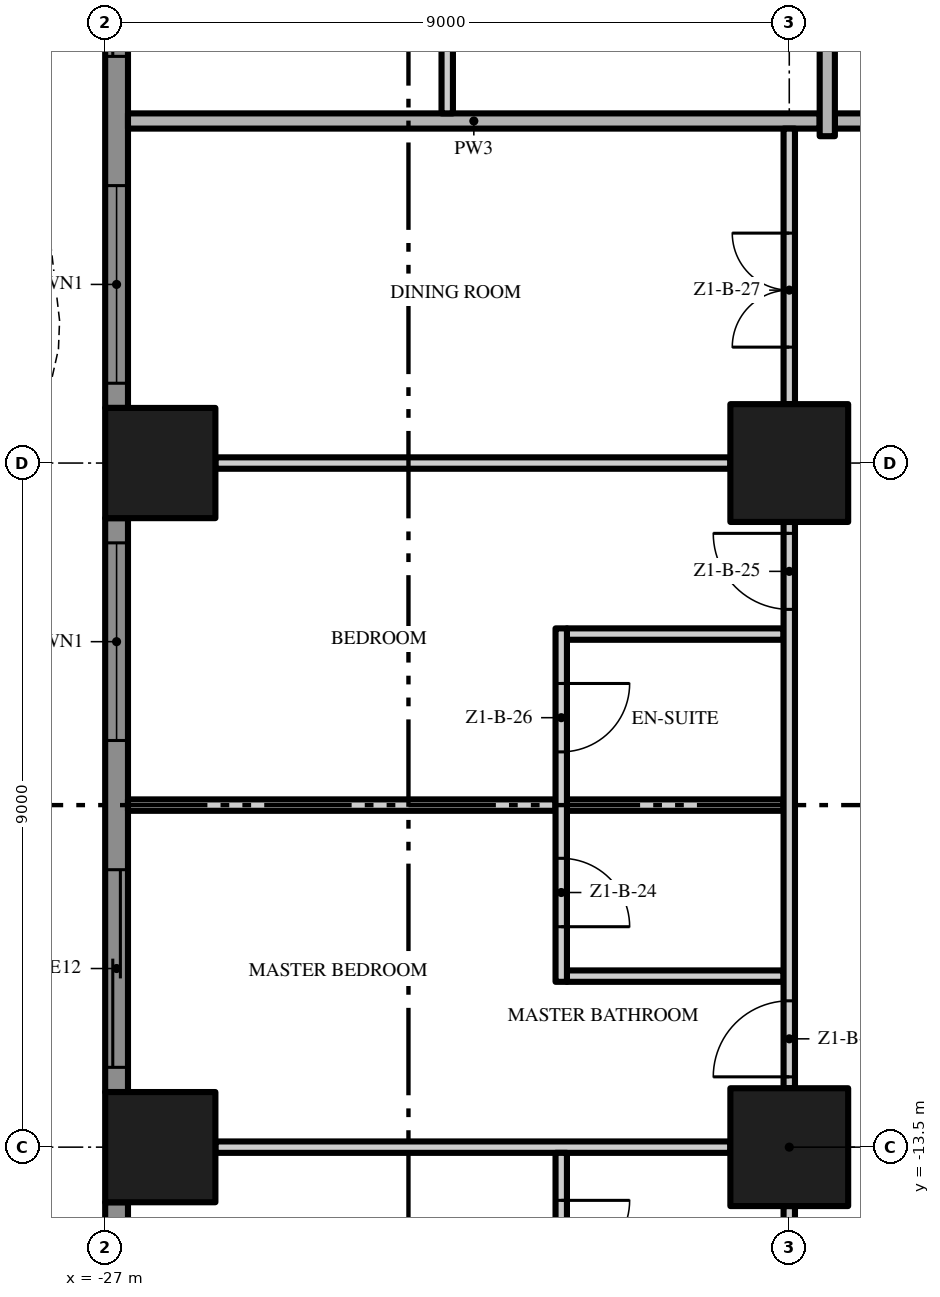
"""IFC4 building model, lengths in metres.
Left out: names, types, materials, properties, quantities, classifications, styles, units other than length and angle.
Written with IfcOpenShell. Run it as: python <this file> out.ifc"""

import sys

from ifc_helpers import new_model, si_unit, direction, frame, frame_2d, origin, origin_2d, place, context, subcontext, project, spatial, polyline, rectangle, outline, extrude, element, fill, save


model = new_model("IFC4")
c1 = context("Model", 3, precision=1e-05, world=origin(), true_north=direction((0.0, 1.0)))
c2 = subcontext(c1, "Body", "Model", "MODEL_VIEW")
j1 = project(units=[si_unit("LENGTHUNIT", "METRE"), si_unit("PLANEANGLEUNIT", "RADIAN")], contexts=[c1])
p1 = place(None, origin())
s1 = spatial("IfcSite", under=j1, at=p1, CompositionType="ELEMENT")
p2 = place(p1, origin())
s2 = spatial("IfcBuilding", under=s1, at=p2, CompositionType="ELEMENT")
p3 = place(p2, frame((0.0, 0.0, 26.4)))
s3 = spatial("IfcBuildingStorey", under=s2, at=p3, CompositionType="ELEMENT", Elevation=26.4)
for number, where, z_axis, x_axis in (
    (1, (-18.0, -13.5, 0.0), (0.0, 0.0, 1.0), (1.0, 0.0, 0.0)),
    (2, (-18.0, -4.5, 0.0), (0.0, 0.0, 1.0), (1.0, 0.0, 0.0)),
):
    element("IfcColumn", number, at=place(p3, frame(where, z_axis=z_axis, x_axis=x_axis)), inside=s3, PredefinedType="COLUMN", context=c2, shape_type="SweptSolid", body=[
        extrude(rectangle(XDim=1.55, YDim=1.55, at=origin_2d()), origin(), (0.0, 0.0, 1.0), 3.5),
    ])
for number, where, z_axis, x_axis in (
    (3, (-26.275, -13.5, 0.0), (0.0, 0.0, 1.0), (1.0, 0.0, 0.0)),
    (4, (-26.275, -4.5, 0.0), (0.0, 0.0, 1.0), (1.0, 0.0, 0.0)),
):
    element("IfcColumn", number, at=place(p3, frame(where, z_axis=z_axis, x_axis=x_axis)), inside=s3, PredefinedType="COLUMN", context=c2, shape_type="SweptSolid", body=[
        extrude(rectangle(XDim=1.45, YDim=1.45, at=origin_2d()), origin(), (0.0, 0.0, 1.0), 3.5),
    ])
p4 = place(p3, frame((-26.85, -3.775, 0.0), z_axis=(0.0, 0.0, 1.0), x_axis=(0.0, 1.0, 0.0)))
e5 = element("IfcWall", 5, at=p4, inside=s3, PredefinedType="SOLIDWALL", context=c2, shape_type="SweptSolid", body=[
    extrude(rectangle(XDim=7.55, YDim=0.3, at=frame_2d((3.775, 0.0))), origin(), (0.0, 0.0, 1.0), 3.5),
])
p5 = place(p4, frame((4.625, 0.0, 0.0)))
e6 = element("IfcOpeningElement", 6, at=p5, cuts=e5, PredefinedType="OPENING", context=c2, shape_type="SweptSolid", body=[
    extrude(rectangle(XDim=2.6, YDim=2.4, at=frame_2d((1.3, 1.2))), frame((0.0, 0.16, 0.0), z_axis=(0.0, -1.0, 0.0), x_axis=(1.0, 0.0, 0.0)), (0.0, 0.0, 1.0), 0.32),
])
p6 = place(p4, frame((0.325, 0.0, 0.45)))
e7 = element("IfcOpeningElement", 7, at=p6, cuts=e5, PredefinedType="OPENING", context=c2, shape_type="SweptSolid", body=[
    extrude(rectangle(XDim=2.6, YDim=2.65, at=frame_2d((1.3, 1.325))), frame((0.0, 0.16, 0.0), z_axis=(0.0, -1.0, 0.0), x_axis=(1.0, 0.0, 0.0)), (0.0, 0.0, 1.0), 0.32),
])
p7 = place(p3, frame((-26.85, -12.775, 0.0), z_axis=(0.0, 0.0, 1.0), x_axis=(0.0, 1.0, 0.0)))
e8 = element("IfcWall", 8, at=p7, inside=s3, PredefinedType="SOLIDWALL", context=c2, shape_type="SweptSolid", body=[
    extrude(rectangle(XDim=7.55, YDim=0.3, at=frame_2d((3.775, 0.0))), origin(), (0.0, 0.0, 1.0), 3.5),
])
p8 = place(p7, frame((4.625, 0.0, 0.45)))
e9 = element("IfcOpeningElement", 9, at=p8, cuts=e8, PredefinedType="OPENING", context=c2, shape_type="SweptSolid", body=[
    extrude(rectangle(XDim=2.6, YDim=2.65, at=frame_2d((1.3, 1.325))), frame((0.0, 0.16, 0.0), z_axis=(0.0, -1.0, 0.0), x_axis=(1.0, 0.0, 0.0)), (0.0, 0.0, 1.0), 0.32),
])
p9 = place(p7, frame((0.325, 0.0, 0.0)))
e10 = element("IfcOpeningElement", 10, at=p9, cuts=e8, PredefinedType="OPENING", context=c2, shape_type="SweptSolid", body=[
    extrude(rectangle(XDim=2.6, YDim=2.4, at=frame_2d((1.3, 1.2))), frame((0.0, 0.16, 0.0), z_axis=(0.0, -1.0, 0.0), x_axis=(1.0, 0.0, 0.0)), (0.0, 0.0, 1.0), 0.32),
])
p10 = place(p3, frame((-26.85, -18.0, 0.0), z_axis=(0.0, 0.0, 1.0), x_axis=(0.0, 1.0, 0.0)))
e11 = element("IfcWall", 11, at=p10, inside=s3, PredefinedType="SOLIDWALL", context=c2, shape_type="SweptSolid", body=[
    extrude(rectangle(XDim=3.775, YDim=0.3, at=frame_2d((1.887, 0.0))), origin(), (0.0, 0.0, 1.0), 3.5),
])
p11 = place(p10, frame((0.85, 0.0, 0.45)))
e12 = element("IfcOpeningElement", 12, at=p11, cuts=e11, PredefinedType="OPENING", context=c2, shape_type="SweptSolid", body=[
    extrude(rectangle(XDim=2.6, YDim=2.65, at=frame_2d((1.3, 1.325))), frame((0.0, 0.16, 0.0), z_axis=(0.0, -1.0, 0.0), x_axis=(1.0, 0.0, 0.0)), (0.0, 0.0, 1.0), 0.32),
])
p12 = place(p3, origin())
e13 = element("IfcWall", 13, at=p12, inside=s3, PredefinedType="USERDEFINED", context=c2, shape_type="SweptSolid", body=[
    extrude(outline(polyline([(-29.649, 18.0), (-28.988, 16.5), (-28.255, 15.0), (-27.731, 13.5), (-27.6, 12.375), (-27.615, 12.0), (-27.951, 10.5), (-28.612, 9.0), (-29.345, 7.5), (-29.869, 6.0), (-30.0, 4.875), (-29.985, 4.5), (-29.649, 3.0), (-28.988, 1.5), (-28.255, 0.0), (-27.731, -1.5), (-27.6, -2.625), (-27.615, -3.0), (-27.951, -4.5), (-28.612, -6.0), (-29.345, -7.5), (-29.869, -9.0), (-30.0, -10.125), (-29.985, -10.5), (-29.649, -12.0), (-28.988, -13.5), (-28.255, -15.0), (-27.731, -16.5), (-27.6, -17.625), (-27.615, -18.0), (-27.365, -18.01), (-27.349, -17.615), (-27.486, -16.444), (-28.024, -14.904), (-28.761, -13.395), (-29.41, -11.921), (-29.736, -10.467), (-29.749, -10.135), (-29.624, -9.056), (-29.114, -7.596), (-28.385, -6.105), (-27.713, -4.579), (-27.366, -3.033), (-27.349, -2.615), (-27.486, -1.444), (-28.024, 0.096), (-28.761, 1.605), (-29.41, 3.079), (-29.736, 4.533), (-29.749, 4.865), (-29.624, 5.944), (-29.114, 7.404), (-28.385, 8.895), (-27.713, 10.421), (-27.366, 11.967), (-27.349, 12.385), (-27.486, 13.556), (-28.024, 15.096), (-28.761, 16.605), (-29.42, 18.101), (-29.649, 18.0)])), origin(), (0.0, 0.0, 1.0), 0.9),
])
p13 = place(p3, frame((-25.55, -13.5, 0.0), z_axis=(0.0, 0.0, 1.0), x_axis=(1.0, 0.0, 0.0)))
e14 = element("IfcWall", 14, at=p13, inside=s3, PredefinedType="PARTITIONING", context=c2, shape_type="SweptSolid", body=[
    extrude(rectangle(XDim=6.775, YDim=0.15, at=frame_2d((3.388, 0.0))), origin(), (0.0, 0.0, 1.0), 3.5),
])
p14 = place(p3, frame((-20.925, -11.25, 0.0), z_axis=(0.0, 0.0, 1.0), x_axis=(1.0, 0.0, 0.0)))
e15 = element("IfcWall", 15, at=p14, inside=s3, PredefinedType="PARTITIONING", context=c2, shape_type="SweptSolid", body=[
    extrude(rectangle(XDim=2.85, YDim=0.15, at=frame_2d((1.425, 0.0))), origin(), (0.0, 0.0, 1.0), 3.5),
])
p15 = place(p3, frame((-26.7, -9.0, 0.0), z_axis=(0.0, 0.0, 1.0), x_axis=(1.0, 0.0, 0.0)))
e16 = element("IfcWall", 16, at=p15, inside=s3, PredefinedType="PARTITIONING", context=c2, shape_type="SweptSolid", body=[
    extrude(rectangle(XDim=5.625, YDim=0.15, at=frame_2d((2.812, 0.0))), origin(), (0.0, 0.0, 1.0), 3.5),
])
for number, where, z_axis, x_axis in (
    (17, (-20.925, -9.0, 0.0), (0.0, 0.0, 1.0), (1.0, 0.0, 0.0)),
    (18, (-20.925, -6.75, 0.0), (0.0, 0.0, 1.0), (1.0, 0.0, 0.0)),
):
    element("IfcWall", number, at=place(p3, frame(where, z_axis=z_axis, x_axis=x_axis)), inside=s3, PredefinedType="PARTITIONING", context=c2, shape_type="SweptSolid", body=[
        extrude(rectangle(XDim=2.85, YDim=0.15, at=frame_2d((1.425, 0.0))), origin(), (0.0, 0.0, 1.0), 3.5),
    ])
p16 = place(p3, frame((-25.55, -4.5, 0.0), z_axis=(0.0, 0.0, 1.0), x_axis=(1.0, 0.0, 0.0)))
e19 = element("IfcWall", 19, at=p16, inside=s3, PredefinedType="PARTITIONING", context=c2, shape_type="SweptSolid", body=[
    extrude(rectangle(XDim=6.775, YDim=0.15, at=frame_2d((3.388, 0.0))), origin(), (0.0, 0.0, 1.0), 3.5),
])
p17 = place(p3, frame((-17.4, 0.0, 0.0), z_axis=(0.0, 0.0, 1.0), x_axis=(1.0, 0.0, 0.0)))
e20 = element("IfcWall", 20, at=p17, inside=s3, PredefinedType="PARTITIONING", context=c2, shape_type="SweptSolid", body=[
    extrude(rectangle(XDim=12.8, YDim=0.2, at=frame_2d((6.4, 0.0))), origin(), (0.0, 0.0, 1.0), 3.5),
])
p18 = place(p3, frame((-26.7, 0.0, 0.0), z_axis=(0.0, 0.0, 1.0), x_axis=(1.0, 0.0, 0.0)))
e21 = element("IfcWall", 21, at=p18, inside=s3, PredefinedType="PARTITIONING", context=c2, shape_type="SweptSolid", body=[
    extrude(rectangle(XDim=9.1, YDim=0.2, at=frame_2d((4.55, 0.0))), origin(), (0.0, 0.0, 1.0), 3.5),
])
p19 = place(p3, frame((-22.5, 0.1, 0.0), z_axis=(0.0, 0.0, 1.0), x_axis=(0.0, 1.0, 0.0)))
e22 = element("IfcWall", 22, at=p19, inside=s3, PredefinedType="PARTITIONING", context=c2, shape_type="SweptSolid", body=[
    extrude(rectangle(XDim=17.175, YDim=0.15, at=frame_2d((8.588, 0.0))), origin(), (0.0, 0.0, 1.0), 3.5),
])
p20 = place(p19, frame((1.65, 0.0, 0.0)))
e23 = element("IfcOpeningElement", 23, at=p20, cuts=e22, PredefinedType="OPENING", context=c2, shape_type="SweptSolid", body=[
    extrude(rectangle(XDim=1.0, YDim=2.4, at=frame_2d((0.5, 1.2))), frame((0.0, 0.085, 0.0), z_axis=(0.0, -1.0, 0.0), x_axis=(1.0, 0.0, 0.0)), (0.0, 0.0, 1.0), 0.17),
])
p21 = place(p19, frame((8.0, 0.0, 0.0)))
e24 = element("IfcOpeningElement", 24, at=p21, cuts=e22, PredefinedType="OPENING", context=c2, shape_type="SweptSolid", body=[
    extrude(rectangle(XDim=1.8, YDim=2.4, at=frame_2d((0.9, 1.2))), frame((0.0, 0.085, 0.0), z_axis=(0.0, -1.0, 0.0), x_axis=(1.0, 0.0, 0.0)), (0.0, 0.0, 1.0), 0.17),
])
p22 = place(p19, frame((16.025, 0.0, 0.0)))
e25 = element("IfcOpeningElement", 25, at=p22, cuts=e22, PredefinedType="OPENING", context=c2, shape_type="SweptSolid", body=[
    extrude(rectangle(XDim=1.0, YDim=2.4, at=frame_2d((0.5, 1.2))), frame((0.0, 0.085, 0.0), z_axis=(0.0, -1.0, 0.0), x_axis=(1.0, 0.0, 0.0)), (0.0, 0.0, 1.0), 0.17),
])
p23 = place(p3, frame((-21.0, -13.575, 0.0), z_axis=(0.0, 0.0, 1.0), x_axis=(0.0, -1.0, 0.0)))
e26 = element("IfcWall", 26, at=p23, inside=s3, PredefinedType="PARTITIONING", context=c2, shape_type="SweptSolid", body=[
    extrude(rectangle(XDim=2.25, YDim=0.15, at=frame_2d((1.125, 0.0))), origin(), (0.0, 0.0, 1.0), 3.5),
])
p24 = place(p23, frame((0.625, 0.0, 0.0)))
e27 = element("IfcOpeningElement", 27, at=p24, cuts=e26, PredefinedType="OPENING", context=c2, shape_type="SweptSolid", body=[
    extrude(rectangle(XDim=0.9, YDim=2.1, at=frame_2d((0.45, 1.05))), frame((0.0, 0.085, 0.0), z_axis=(0.0, -1.0, 0.0), x_axis=(1.0, 0.0, 0.0)), (0.0, 0.0, 1.0), 0.17),
])
p25 = place(p3, frame((-21.0, -6.675, 0.0), z_axis=(0.0, 0.0, 1.0), x_axis=(0.0, -1.0, 0.0)))
e28 = element("IfcWall", 28, at=p25, inside=s3, PredefinedType="PARTITIONING", context=c2, shape_type="SweptSolid", body=[
    extrude(rectangle(XDim=4.65, YDim=0.15, at=frame_2d((2.325, 0.0))), origin(), (0.0, 0.0, 1.0), 3.5),
])
p26 = place(p25, frame((3.025, 0.0, 0.0)))
e29 = element("IfcOpeningElement", 29, at=p26, cuts=e28, PredefinedType="OPENING", context=c2, shape_type="SweptSolid", body=[
    extrude(rectangle(XDim=0.9, YDim=2.1, at=frame_2d((0.45, 1.05))), frame((0.0, 0.085, 0.0), z_axis=(0.0, -1.0, 0.0), x_axis=(1.0, 0.0, 0.0)), (0.0, 0.0, 1.0), 0.17),
])
p27 = place(p25, frame((0.725, 0.0, 0.0)))
e30 = element("IfcOpeningElement", 30, at=p27, cuts=e28, PredefinedType="OPENING", context=c2, shape_type="SweptSolid", body=[
    extrude(rectangle(XDim=0.9, YDim=2.1, at=frame_2d((0.45, 1.05))), frame((0.0, 0.085, 0.0), z_axis=(0.0, -1.0, 0.0), x_axis=(1.0, 0.0, 0.0)), (0.0, 0.0, 1.0), 0.17),
])
p28 = place(p3, frame((-18.0, -21.05, 0.0), z_axis=(0.0, 0.0, 1.0), x_axis=(0.0, 1.0, 0.0)))
e31 = element("IfcWall", 31, at=p28, inside=s3, PredefinedType="PARTITIONING", context=c2, shape_type="SweptSolid", body=[
    extrude(rectangle(XDim=6.775, YDim=0.15, at=frame_2d((3.388, 0.0))), origin(), (0.0, 0.0, 1.0), 3.5),
])
p29 = place(p28, frame((1.0, 0.0, 0.0)))
e32 = element("IfcOpeningElement", 32, at=p29, cuts=e31, PredefinedType="OPENING", context=c2, shape_type="SweptSolid", body=[
    extrude(rectangle(XDim=1.8, YDim=2.4, at=frame_2d((0.9, 1.2))), frame((0.0, 0.085, 0.0), z_axis=(0.0, -1.0, 0.0), x_axis=(1.0, 0.0, 0.0)), (0.0, 0.0, 1.0), 0.17),
])
p30 = place(p3, frame((-18.0, -12.725, 0.0), z_axis=(0.0, 0.0, 1.0), x_axis=(0.0, 1.0, 0.0)))
e33 = element("IfcWall", 33, at=p30, inside=s3, PredefinedType="PARTITIONING", context=c2, shape_type="SweptSolid", body=[
    extrude(rectangle(XDim=7.45, YDim=0.15, at=frame_2d((3.725, 0.0))), origin(), (0.0, 0.0, 1.0), 3.5),
])
p31 = place(p30, frame((0.15, 0.0, 0.0)))
e34 = element("IfcOpeningElement", 34, at=p31, cuts=e33, PredefinedType="OPENING", context=c2, shape_type="SweptSolid", body=[
    extrude(rectangle(XDim=1.0, YDim=2.4, at=frame_2d((0.5, 1.2))), frame((0.0, 0.085, 0.0), z_axis=(0.0, -1.0, 0.0), x_axis=(1.0, 0.0, 0.0)), (0.0, 0.0, 1.0), 0.17),
])
p32 = place(p30, frame((6.3, 0.0, 0.0)))
e35 = element("IfcOpeningElement", 35, at=p32, cuts=e33, PredefinedType="OPENING", context=c2, shape_type="SweptSolid", body=[
    extrude(rectangle(XDim=1.0, YDim=2.4, at=frame_2d((0.5, 1.2))), frame((0.0, 0.085, 0.0), z_axis=(0.0, -1.0, 0.0), x_axis=(1.0, 0.0, 0.0)), (0.0, 0.0, 1.0), 0.17),
])
p33 = place(p3, frame((-18.0, -3.725, 0.0), z_axis=(0.0, 0.0, 1.0), x_axis=(0.0, 1.0, 0.0)))
e36 = element("IfcWall", 36, at=p33, inside=s3, PredefinedType="PARTITIONING", context=c2, shape_type="SweptSolid", body=[
    extrude(rectangle(XDim=3.625, YDim=0.15, at=frame_2d((1.812, 0.0))), origin(), (0.0, 0.0, 1.0), 3.5),
])
p34 = place(p33, frame((0.75, 0.0, 0.0)))
e37 = element("IfcOpeningElement", 37, at=p34, cuts=e36, PredefinedType="OPENING", context=c2, shape_type="SweptSolid", body=[
    extrude(rectangle(XDim=1.5, YDim=2.4, at=frame_2d((0.75, 1.2))), frame((0.0, 0.085, 0.0), z_axis=(0.0, -1.0, 0.0), x_axis=(1.0, 0.0, 0.0)), (0.0, 0.0, 1.0), 0.17),
])
p35 = place(p3, frame((-17.5, -0.2, 0.0), z_axis=(0.0, 0.0, 1.0), x_axis=(0.0, 1.0, 0.0)))
e38 = element("IfcWall", 38, at=p35, inside=s3, PredefinedType="PARTITIONING", context=c2, shape_type="SweptSolid", body=[
    extrude(rectangle(XDim=3.925, YDim=0.2, at=frame_2d((1.962, 0.0))), origin(), (0.0, 0.0, 1.0), 3.5),
])
p36 = place(p5, origin())
e39 = element("IfcDoor", 39, at=p36, inside=s3, OperationType="SINGLE_SWING_LEFT", PredefinedType="DOOR", context=c2, shape_type="SweptSolid", body=[
    extrude(rectangle(XDim=2.6, YDim=2.4, at=frame_2d((1.3, 1.2))), frame((0.0, 0.025, 0.0), z_axis=(0.0, -1.0, 0.0), x_axis=(1.0, 0.0, 0.0)), (0.0, 0.0, 1.0), 0.05),
])
fill(e6, e39)
p37 = place(p6, origin())
e40 = element("IfcWindow", 40, at=p37, inside=s3, PartitioningType="SINGLE_PANEL", PredefinedType="WINDOW", context=c2, shape_type="SweptSolid", body=[
    extrude(rectangle(XDim=2.6, YDim=2.65, at=frame_2d((1.3, 1.325))), frame((0.0, 0.03, 0.0), z_axis=(0.0, -1.0, 0.0), x_axis=(1.0, 0.0, 0.0)), (0.0, 0.0, 1.0), 0.06),
])
fill(e7, e40)
p38 = place(p8, origin())
e41 = element("IfcWindow", 41, at=p38, inside=s3, PartitioningType="SINGLE_PANEL", PredefinedType="WINDOW", context=c2, shape_type="SweptSolid", body=[
    extrude(rectangle(XDim=2.6, YDim=2.65, at=frame_2d((1.3, 1.325))), frame((0.0, 0.03, 0.0), z_axis=(0.0, -1.0, 0.0), x_axis=(1.0, 0.0, 0.0)), (0.0, 0.0, 1.0), 0.06),
])
fill(e9, e41)
p39 = place(p9, origin())
e42 = element("IfcDoor", 42, at=p39, inside=s3, OperationType="SINGLE_SWING_LEFT", PredefinedType="DOOR", context=c2, shape_type="SweptSolid", body=[
    extrude(rectangle(XDim=2.6, YDim=2.4, at=frame_2d((1.3, 1.2))), frame((0.0, 0.025, 0.0), z_axis=(0.0, -1.0, 0.0), x_axis=(1.0, 0.0, 0.0)), (0.0, 0.0, 1.0), 0.05),
])
fill(e10, e42)
p40 = place(p24, origin())
e43 = element("IfcDoor", 43, at=p40, inside=s3, OperationType="SINGLE_SWING_LEFT", PredefinedType="DOOR", context=c2, shape_type="SweptSolid", body=[
    extrude(rectangle(XDim=0.9, YDim=2.1, at=frame_2d((0.45, 1.05))), frame((0.0, 0.025, 0.0), z_axis=(0.0, -1.0, 0.0), x_axis=(1.0, 0.0, 0.0)), (0.0, 0.0, 1.0), 0.05),
])
fill(e27, e43)
p41 = place(p31, origin())
e44 = element("IfcDoor", 44, at=p41, inside=s3, OperationType="SINGLE_SWING_LEFT", PredefinedType="DOOR", context=c2, shape_type="SweptSolid", body=[
    extrude(rectangle(XDim=1.0, YDim=2.4, at=frame_2d((0.5, 1.2))), frame((0.0, 0.025, 0.0), z_axis=(0.0, -1.0, 0.0), x_axis=(1.0, 0.0, 0.0)), (0.0, 0.0, 1.0), 0.05),
])
fill(e34, e44)
p42 = place(p26, origin())
e45 = element("IfcDoor", 45, at=p42, inside=s3, OperationType="SINGLE_SWING_RIGHT", PredefinedType="DOOR", context=c2, shape_type="SweptSolid", body=[
    extrude(rectangle(XDim=0.9, YDim=2.1, at=frame_2d((0.45, 1.05))), frame((0.0, 0.025, 0.0), z_axis=(0.0, -1.0, 0.0), x_axis=(1.0, 0.0, 0.0)), (0.0, 0.0, 1.0), 0.05),
])
fill(e29, e45)
p43 = place(p32, origin())
e46 = element("IfcDoor", 46, at=p43, inside=s3, OperationType="SINGLE_SWING_RIGHT", PredefinedType="DOOR", context=c2, shape_type="SweptSolid", body=[
    extrude(rectangle(XDim=1.0, YDim=2.4, at=frame_2d((0.5, 1.2))), frame((0.0, 0.025, 0.0), z_axis=(0.0, -1.0, 0.0), x_axis=(1.0, 0.0, 0.0)), (0.0, 0.0, 1.0), 0.05),
])
fill(e35, e46)
p44 = place(p27, origin())
e47 = element("IfcDoor", 47, at=p44, inside=s3, OperationType="SINGLE_SWING_LEFT", PredefinedType="DOOR", context=c2, shape_type="SweptSolid", body=[
    extrude(rectangle(XDim=0.9, YDim=2.1, at=frame_2d((0.45, 1.05))), frame((0.0, 0.025, 0.0), z_axis=(0.0, -1.0, 0.0), x_axis=(1.0, 0.0, 0.0)), (0.0, 0.0, 1.0), 0.05),
])
fill(e30, e47)
p45 = place(p34, origin())
e48 = element("IfcDoor", 48, at=p45, inside=s3, OperationType="DOUBLE_DOOR_SINGLE_SWING", PredefinedType="DOOR", context=c2, shape_type="SweptSolid", body=[
    extrude(rectangle(XDim=1.5, YDim=2.4, at=frame_2d((0.75, 1.2))), frame((0.0, 0.025, 0.0), z_axis=(0.0, -1.0, 0.0), x_axis=(1.0, 0.0, 0.0)), (0.0, 0.0, 1.0), 0.05),
])
fill(e37, e48)
save(model, sys.argv[1])
